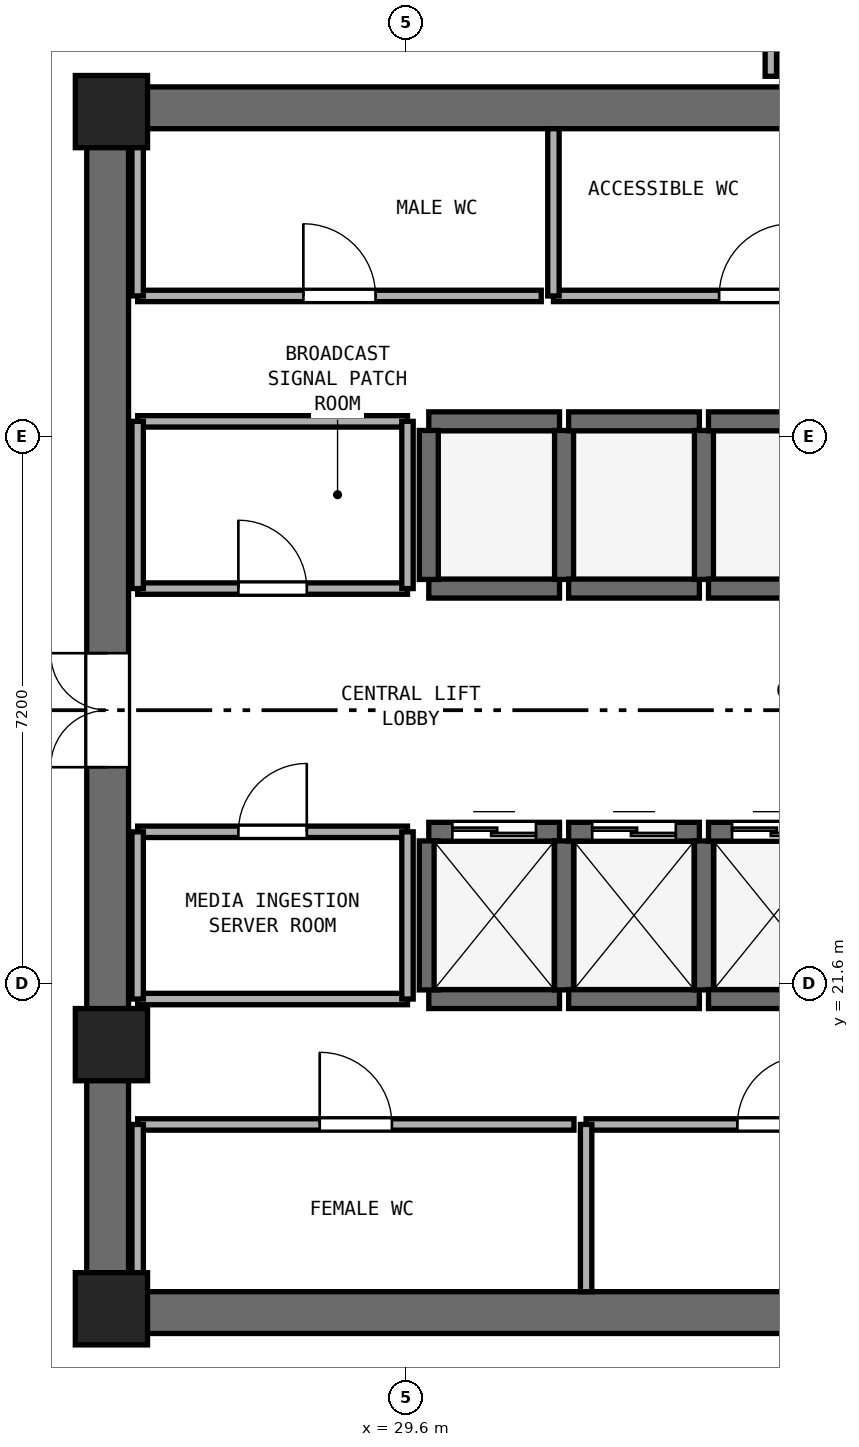
"""IFC4 building model, lengths in metres.
Left out: names, types, materials, properties, quantities, classifications, styles, units other than length and angle.
Written with IfcOpenShell. Run it as: python <this file> out.ifc"""

import sys

from ifc_helpers import new_model, si_unit, direction, frame, frame_2d, origin, origin_2d, place, context, subcontext, project, spatial, rectangle, extrude, element, fill, save


model = new_model("IFC4")
c1 = context("Model", 3, precision=1e-05, world=origin(), true_north=direction((0.0, 1.0)))
c2 = subcontext(c1, "Body", "Model", "MODEL_VIEW")
j1 = project(units=[si_unit("LENGTHUNIT", "METRE"), si_unit("PLANEANGLEUNIT", "RADIAN")], contexts=[c1])
p1 = place(None, origin())
s1 = spatial("IfcSite", under=j1, at=p1, CompositionType="ELEMENT")
p2 = place(p1, origin())
s2 = spatial("IfcBuilding", under=s1, at=p2, CompositionType="ELEMENT")
p3 = place(p2, frame((0.0, 0.0, 136.4)))
s3 = spatial("IfcBuildingStorey", under=s2, at=p3, CompositionType="ELEMENT", Elevation=136.4)
for number, where, z_axis, x_axis in (
    (1, (25.4, 17.275, 0.0), (0.0, 0.0, 1.0), (1.0, 0.0, 0.0)),
    (2, (25.4, 33.125, 0.0), (0.0, 0.0, 1.0), (1.0, 0.0, 0.0)),
):
    element("IfcWall", number, at=place(p3, frame(where, z_axis=z_axis, x_axis=x_axis)), inside=s3, PredefinedType="SHEAR", context=c2, shape_type="SweptSolid", body=[
        extrude(rectangle(XDim=23.2, YDim=0.55, at=frame_2d((11.6, 0.0))), origin(), (0.0, 0.0, 1.0), 3.54),
    ])
p4 = place(p3, frame((25.675, 17.55, 0.0), z_axis=(0.0, 0.0, 1.0), x_axis=(0.0, 1.0, 0.0)))
e3 = element("IfcWall", 3, at=p4, inside=s3, PredefinedType="SHEAR", context=c2, shape_type="SweptSolid", body=[
    extrude(rectangle(XDim=15.3, YDim=0.55, at=frame_2d((7.65, 0.0))), origin(), (0.0, 0.0, 1.0), 3.54),
])
p5 = place(p4, frame((6.9, 0.0, 0.0)))
e4 = element("IfcOpeningElement", 4, at=p5, cuts=e3, PredefinedType="OPENING", context=c2, shape_type="SweptSolid", body=[
    extrude(rectangle(XDim=1.5, YDim=2.15, at=frame_2d((0.75, 1.075))), frame((0.0, 0.285, 0.0), z_axis=(0.0, -1.0, 0.0), x_axis=(1.0, 0.0, 0.0)), (0.0, 0.0, 1.0), 0.57),
])
for number, where, z_axis, x_axis in (
    (5, (25.725, 17.325, 0.0), (0.0, 0.0, 1.0), (1.0, 0.0, 0.0)),
    (6, (25.725, 33.075, 0.0), (0.0, 0.0, 1.0), (1.0, 0.0, 0.0)),
    (7, (25.725, 20.8, 0.0), (0.0, 0.0, 1.0), (1.0, 0.0, 0.0)),
):
    element("IfcColumn", number, at=place(p3, frame(where, z_axis=z_axis, x_axis=x_axis)), inside=s3, PredefinedType="PILASTER", context=c2, shape_type="SweptSolid", body=[
        extrude(rectangle(XDim=0.95, YDim=0.95, at=origin_2d()), origin(), (0.0, 0.0, 1.0), 3.8),
    ])
p6 = place(p3, frame((29.9, 21.4, 0.0), z_axis=(0.0, 0.0, 1.0), x_axis=(1.0, 0.0, 0.0)))
e8 = element("IfcWall", 8, at=p6, inside=s3, PredefinedType="SHEAR", context=c2, shape_type="SweptSolid", body=[
    extrude(rectangle(XDim=1.72, YDim=0.25, at=frame_2d((0.86, 0.0))), origin(), (0.0, 0.0, 1.0), 3.54),
])
p7 = place(p3, frame((29.9, 23.6, 0.0), z_axis=(0.0, 0.0, 1.0), x_axis=(1.0, 0.0, 0.0)))
e9 = element("IfcWall", 9, at=p7, inside=s3, PredefinedType="SHEAR", context=c2, shape_type="SweptSolid", body=[
    extrude(rectangle(XDim=1.72, YDim=0.25, at=frame_2d((0.86, 0.0))), origin(), (0.0, 0.0, 1.0), 3.54),
])
p8 = place(p7, frame((0.31, 0.0, 0.0)))
e10 = element("IfcOpeningElement", 10, at=p8, cuts=e9, PredefinedType="OPENING", context=c2, shape_type="SweptSolid", body=[
    extrude(rectangle(XDim=1.1, YDim=2.15, at=frame_2d((0.55, 1.075))), frame((0.0, 0.135, 0.0), z_axis=(0.0, -1.0, 0.0), x_axis=(1.0, 0.0, 0.0)), (0.0, 0.0, 1.0), 0.27),
])
for number, where, z_axis, x_axis in (
    (11, (29.9, 21.52, 0.0), (0.0, 0.0, 1.0), (0.0, 1.0, 0.0)),
    (12, (31.68, 21.52, 0.0), (0.0, 0.0, 1.0), (0.0, 1.0, 0.0)),
):
    element("IfcWall", number, at=place(p3, frame(where, z_axis=z_axis, x_axis=x_axis)), inside=s3, PredefinedType="SHEAR", context=c2, shape_type="SweptSolid", body=[
        extrude(rectangle(XDim=1.96, YDim=0.25, at=frame_2d((0.98, 0.0))), origin(), (0.0, 0.0, 1.0), 3.54),
    ])
p9 = place(p3, frame((31.74, 21.4, 0.0), z_axis=(0.0, 0.0, 1.0), x_axis=(1.0, 0.0, 0.0)))
e13 = element("IfcWall", 13, at=p9, inside=s3, PredefinedType="SHEAR", context=c2, shape_type="SweptSolid", body=[
    extrude(rectangle(XDim=1.72, YDim=0.25, at=frame_2d((0.86, 0.0))), origin(), (0.0, 0.0, 1.0), 3.54),
])
p10 = place(p3, frame((31.74, 23.6, 0.0), z_axis=(0.0, 0.0, 1.0), x_axis=(1.0, 0.0, 0.0)))
e14 = element("IfcWall", 14, at=p10, inside=s3, PredefinedType="SHEAR", context=c2, shape_type="SweptSolid", body=[
    extrude(rectangle(XDim=1.72, YDim=0.25, at=frame_2d((0.86, 0.0))), origin(), (0.0, 0.0, 1.0), 3.54),
])
p11 = place(p10, frame((0.31, 0.0, 0.0)))
e15 = element("IfcOpeningElement", 15, at=p11, cuts=e14, PredefinedType="OPENING", context=c2, shape_type="SweptSolid", body=[
    extrude(rectangle(XDim=1.1, YDim=2.15, at=frame_2d((0.55, 1.075))), frame((0.0, 0.135, 0.0), z_axis=(0.0, -1.0, 0.0), x_axis=(1.0, 0.0, 0.0)), (0.0, 0.0, 1.0), 0.27),
])
p12 = place(p3, frame((33.52, 21.52, 0.0), z_axis=(0.0, 0.0, 1.0), x_axis=(0.0, 1.0, 0.0)))
e16 = element("IfcWall", 16, at=p12, inside=s3, PredefinedType="SHEAR", context=c2, shape_type="SweptSolid", body=[
    extrude(rectangle(XDim=1.96, YDim=0.25, at=frame_2d((0.98, 0.0))), origin(), (0.0, 0.0, 1.0), 3.54),
])
p13 = place(p3, frame((33.58, 21.4, 0.0), z_axis=(0.0, 0.0, 1.0), x_axis=(1.0, 0.0, 0.0)))
e17 = element("IfcWall", 17, at=p13, inside=s3, PredefinedType="SHEAR", context=c2, shape_type="SweptSolid", body=[
    extrude(rectangle(XDim=1.72, YDim=0.25, at=frame_2d((0.86, 0.0))), origin(), (0.0, 0.0, 1.0), 3.54),
])
p14 = place(p3, frame((33.58, 23.6, 0.0), z_axis=(0.0, 0.0, 1.0), x_axis=(1.0, 0.0, 0.0)))
e18 = element("IfcWall", 18, at=p14, inside=s3, PredefinedType="SHEAR", context=c2, shape_type="SweptSolid", body=[
    extrude(rectangle(XDim=1.72, YDim=0.25, at=frame_2d((0.86, 0.0))), origin(), (0.0, 0.0, 1.0), 3.54),
])
p15 = place(p14, frame((0.31, 0.0, 0.0)))
e19 = element("IfcOpeningElement", 19, at=p15, cuts=e18, PredefinedType="OPENING", context=c2, shape_type="SweptSolid", body=[
    extrude(rectangle(XDim=1.1, YDim=2.15, at=frame_2d((0.55, 1.075))), frame((0.0, 0.135, 0.0), z_axis=(0.0, -1.0, 0.0), x_axis=(1.0, 0.0, 0.0)), (0.0, 0.0, 1.0), 0.27),
])
for number, where, z_axis, x_axis in (
    (20, (29.9, 26.8, 0.0), (0.0, 0.0, 1.0), (1.0, 0.0, 0.0)),
    (21, (29.9, 29.0, 0.0), (0.0, 0.0, 1.0), (1.0, 0.0, 0.0)),
):
    element("IfcWall", number, at=place(p3, frame(where, z_axis=z_axis, x_axis=x_axis)), inside=s3, PredefinedType="SHEAR", context=c2, shape_type="SweptSolid", body=[
        extrude(rectangle(XDim=1.72, YDim=0.25, at=frame_2d((0.86, 0.0))), origin(), (0.0, 0.0, 1.0), 3.54),
    ])
for number, where, z_axis, x_axis in (
    (22, (29.9, 26.92, 0.0), (0.0, 0.0, 1.0), (0.0, 1.0, 0.0)),
    (23, (31.68, 26.92, 0.0), (0.0, 0.0, 1.0), (0.0, 1.0, 0.0)),
):
    element("IfcWall", number, at=place(p3, frame(where, z_axis=z_axis, x_axis=x_axis)), inside=s3, PredefinedType="SHEAR", context=c2, shape_type="SweptSolid", body=[
        extrude(rectangle(XDim=1.96, YDim=0.25, at=frame_2d((0.98, 0.0))), origin(), (0.0, 0.0, 1.0), 3.54),
    ])
for number, where, z_axis, x_axis in (
    (24, (31.74, 26.8, 0.0), (0.0, 0.0, 1.0), (1.0, 0.0, 0.0)),
    (25, (31.74, 29.0, 0.0), (0.0, 0.0, 1.0), (1.0, 0.0, 0.0)),
):
    element("IfcWall", number, at=place(p3, frame(where, z_axis=z_axis, x_axis=x_axis)), inside=s3, PredefinedType="SHEAR", context=c2, shape_type="SweptSolid", body=[
        extrude(rectangle(XDim=1.72, YDim=0.25, at=frame_2d((0.86, 0.0))), origin(), (0.0, 0.0, 1.0), 3.54),
    ])
p16 = place(p3, frame((33.52, 26.92, 0.0), z_axis=(0.0, 0.0, 1.0), x_axis=(0.0, 1.0, 0.0)))
e26 = element("IfcWall", 26, at=p16, inside=s3, PredefinedType="SHEAR", context=c2, shape_type="SweptSolid", body=[
    extrude(rectangle(XDim=1.96, YDim=0.25, at=frame_2d((0.98, 0.0))), origin(), (0.0, 0.0, 1.0), 3.54),
])
for number, where, z_axis, x_axis in (
    (27, (33.58, 26.8, 0.0), (0.0, 0.0, 1.0), (1.0, 0.0, 0.0)),
    (28, (33.58, 29.0, 0.0), (0.0, 0.0, 1.0), (1.0, 0.0, 0.0)),
):
    element("IfcWall", number, at=place(p3, frame(where, z_axis=z_axis, x_axis=x_axis)), inside=s3, PredefinedType="SHEAR", context=c2, shape_type="SweptSolid", body=[
        extrude(rectangle(XDim=1.72, YDim=0.25, at=frame_2d((0.86, 0.0))), origin(), (0.0, 0.0, 1.0), 3.54),
    ])
p17 = place(p3, frame((26.07, 30.65, 0.0), z_axis=(0.0, 0.0, 1.0), x_axis=(1.0, 0.0, 0.0)))
e29 = element("IfcWall", 29, at=p17, inside=s3, PredefinedType="PARTITIONING", context=c2, shape_type="SweptSolid", body=[
    extrude(rectangle(XDim=5.31, YDim=0.15, at=frame_2d((2.655, 0.0))), origin(), (0.0, 0.0, 1.0), 3.54),
])
p18 = place(p17, frame((2.18, 0.0, 0.0)))
e30 = element("IfcOpeningElement", 30, at=p18, cuts=e29, PredefinedType="OPENING", context=c2, shape_type="SweptSolid", body=[
    extrude(rectangle(XDim=0.95, YDim=2.1, at=frame_2d((0.475, 1.05))), frame((0.0, 0.085, 0.0), z_axis=(0.0, -1.0, 0.0), x_axis=(1.0, 0.0, 0.0)), (0.0, 0.0, 1.0), 0.17),
])
p19 = place(p3, frame((26.07, 30.65, 0.0), z_axis=(0.0, 0.0, 1.0), x_axis=(0.0, 1.0, 0.0)))
e31 = element("IfcWall", 31, at=p19, inside=s3, PredefinedType="PARTITIONING", context=c2, shape_type="SweptSolid", body=[
    extrude(rectangle(XDim=2.2, YDim=0.15, at=frame_2d((1.1, 0.0))), origin(), (0.0, 0.0, 1.0), 2.64),
])
p20 = place(p3, frame((31.54, 30.65, 0.0), z_axis=(0.0, 0.0, 1.0), x_axis=(1.0, 0.0, 0.0)))
e32 = element("IfcWall", 32, at=p20, inside=s3, PredefinedType="PARTITIONING", context=c2, shape_type="SweptSolid", body=[
    extrude(rectangle(XDim=5.31, YDim=0.15, at=frame_2d((2.655, 0.0))), origin(), (0.0, 0.0, 1.0), 3.54),
])
p21 = place(p20, frame((2.18, 0.0, 0.0)))
e33 = element("IfcOpeningElement", 33, at=p21, cuts=e32, PredefinedType="OPENING", context=c2, shape_type="SweptSolid", body=[
    extrude(rectangle(XDim=0.95, YDim=2.1, at=frame_2d((0.475, 1.05))), frame((0.0, 0.085, 0.0), z_axis=(0.0, -1.0, 0.0), x_axis=(1.0, 0.0, 0.0)), (0.0, 0.0, 1.0), 0.17),
])
p22 = place(p3, frame((31.54, 30.65, 0.0), z_axis=(0.0, 0.0, 1.0), x_axis=(0.0, 1.0, 0.0)))
e34 = element("IfcWall", 34, at=p22, inside=s3, PredefinedType="PARTITIONING", context=c2, shape_type="SweptSolid", body=[
    extrude(rectangle(XDim=2.2, YDim=0.15, at=frame_2d((1.1, 0.0))), origin(), (0.0, 0.0, 1.0), 3.54),
])
p23 = place(p3, frame((26.07, 19.75, 0.0), z_axis=(0.0, 0.0, 1.0), x_axis=(1.0, 0.0, 0.0)))
e35 = element("IfcWall", 35, at=p23, inside=s3, PredefinedType="PARTITIONING", context=c2, shape_type="SweptSolid", body=[
    extrude(rectangle(XDim=5.74, YDim=0.15, at=frame_2d((2.87, 0.0))), origin(), (0.0, 0.0, 1.0), 3.54),
])
p24 = place(p23, frame((2.395, 0.0, 0.0)))
e36 = element("IfcOpeningElement", 36, at=p24, cuts=e35, PredefinedType="OPENING", context=c2, shape_type="SweptSolid", body=[
    extrude(rectangle(XDim=0.95, YDim=2.1, at=frame_2d((0.475, 1.05))), frame((0.0, 0.085, 0.0), z_axis=(0.0, -1.0, 0.0), x_axis=(1.0, 0.0, 0.0)), (0.0, 0.0, 1.0), 0.17),
])
p25 = place(p3, frame((26.07, 17.55, 0.0), z_axis=(0.0, 0.0, 1.0), x_axis=(0.0, 1.0, 0.0)))
e37 = element("IfcWall", 37, at=p25, inside=s3, PredefinedType="PARTITIONING", context=c2, shape_type="SweptSolid", body=[
    extrude(rectangle(XDim=2.2, YDim=0.15, at=frame_2d((1.1, 0.0))), origin(), (0.0, 0.0, 1.0), 2.64),
])
p26 = place(p3, frame((31.97, 19.75, 0.0), z_axis=(0.0, 0.0, 1.0), x_axis=(1.0, 0.0, 0.0)))
e38 = element("IfcWall", 38, at=p26, inside=s3, PredefinedType="PARTITIONING", context=c2, shape_type="SweptSolid", body=[
    extrude(rectangle(XDim=4.88, YDim=0.15, at=frame_2d((2.44, 0.0))), origin(), (0.0, 0.0, 1.0), 3.54),
])
p27 = place(p26, frame((1.99, 0.0, 0.0)))
e39 = element("IfcOpeningElement", 39, at=p27, cuts=e38, PredefinedType="OPENING", context=c2, shape_type="SweptSolid", body=[
    extrude(rectangle(XDim=0.9, YDim=2.1, at=frame_2d((0.45, 1.05))), frame((0.0, 0.085, 0.0), z_axis=(0.0, -1.0, 0.0), x_axis=(1.0, 0.0, 0.0)), (0.0, 0.0, 1.0), 0.17),
])
p28 = place(p3, frame((31.97, 17.55, 0.0), z_axis=(0.0, 0.0, 1.0), x_axis=(0.0, 1.0, 0.0)))
e40 = element("IfcWall", 40, at=p28, inside=s3, PredefinedType="PARTITIONING", context=c2, shape_type="SweptSolid", body=[
    extrude(rectangle(XDim=2.2, YDim=0.15, at=frame_2d((1.1, 0.0))), origin(), (0.0, 0.0, 1.0), 3.54),
])
p29 = place(p3, frame((26.07, 26.8, 0.0), z_axis=(0.0, 0.0, 1.0), x_axis=(1.0, 0.0, 0.0)))
e41 = element("IfcWall", 41, at=p29, inside=s3, PredefinedType="PARTITIONING", context=c2, shape_type="SweptSolid", body=[
    extrude(rectangle(XDim=3.55, YDim=0.15, at=frame_2d((1.775, 0.0))), origin(), (0.0, 0.0, 1.0), 3.54),
])
p30 = place(p29, frame((1.325, 0.0, 0.0)))
e42 = element("IfcOpeningElement", 42, at=p30, cuts=e41, PredefinedType="OPENING", context=c2, shape_type="SweptSolid", body=[
    extrude(rectangle(XDim=0.9, YDim=2.1, at=frame_2d((0.45, 1.05))), frame((0.0, 0.085, 0.0), z_axis=(0.0, -1.0, 0.0), x_axis=(1.0, 0.0, 0.0)), (0.0, 0.0, 1.0), 0.17),
])
p31 = place(p3, frame((26.07, 29.0, 0.0), z_axis=(0.0, 0.0, 1.0), x_axis=(1.0, 0.0, 0.0)))
e43 = element("IfcWall", 43, at=p31, inside=s3, PredefinedType="PARTITIONING", context=c2, shape_type="SweptSolid", body=[
    extrude(rectangle(XDim=3.55, YDim=0.15, at=frame_2d((1.775, 0.0))), origin(), (0.0, 0.0, 1.0), 3.54),
])
p32 = place(p3, frame((26.07, 26.8, 0.0), z_axis=(0.0, 0.0, 1.0), x_axis=(0.0, 1.0, 0.0)))
e44 = element("IfcWall", 44, at=p32, inside=s3, PredefinedType="PARTITIONING", context=c2, shape_type="SweptSolid", body=[
    extrude(rectangle(XDim=2.2, YDim=0.15, at=frame_2d((1.1, 0.0))), origin(), (0.0, 0.0, 1.0), 2.64),
])
p33 = place(p3, frame((29.62, 26.8, 0.0), z_axis=(0.0, 0.0, 1.0), x_axis=(0.0, 1.0, 0.0)))
e45 = element("IfcWall", 45, at=p33, inside=s3, PredefinedType="PARTITIONING", context=c2, shape_type="SweptSolid", body=[
    extrude(rectangle(XDim=2.2, YDim=0.15, at=frame_2d((1.1, 0.0))), origin(), (0.0, 0.0, 1.0), 3.54),
])
p34 = place(p3, frame((26.07, 21.4, 0.0), z_axis=(0.0, 0.0, 1.0), x_axis=(1.0, 0.0, 0.0)))
e46 = element("IfcWall", 46, at=p34, inside=s3, PredefinedType="PARTITIONING", context=c2, shape_type="SweptSolid", body=[
    extrude(rectangle(XDim=3.55, YDim=0.15, at=frame_2d((1.775, 0.0))), origin(), (0.0, 0.0, 1.0), 3.54),
])
p35 = place(p3, frame((26.07, 23.6, 0.0), z_axis=(0.0, 0.0, 1.0), x_axis=(1.0, 0.0, 0.0)))
e47 = element("IfcWall", 47, at=p35, inside=s3, PredefinedType="PARTITIONING", context=c2, shape_type="SweptSolid", body=[
    extrude(rectangle(XDim=3.55, YDim=0.15, at=frame_2d((1.775, 0.0))), origin(), (0.0, 0.0, 1.0), 3.54),
])
p36 = place(p35, frame((1.325, 0.0, 0.0)))
e48 = element("IfcOpeningElement", 48, at=p36, cuts=e47, PredefinedType="OPENING", context=c2, shape_type="SweptSolid", body=[
    extrude(rectangle(XDim=0.9, YDim=2.1, at=frame_2d((0.45, 1.05))), frame((0.0, 0.085, 0.0), z_axis=(0.0, -1.0, 0.0), x_axis=(1.0, 0.0, 0.0)), (0.0, 0.0, 1.0), 0.17),
])
p37 = place(p3, frame((26.07, 21.4, 0.0), z_axis=(0.0, 0.0, 1.0), x_axis=(0.0, 1.0, 0.0)))
e49 = element("IfcWall", 49, at=p37, inside=s3, PredefinedType="PARTITIONING", context=c2, shape_type="SweptSolid", body=[
    extrude(rectangle(XDim=2.2, YDim=0.15, at=frame_2d((1.1, 0.0))), origin(), (0.0, 0.0, 1.0), 2.64),
])
p38 = place(p3, frame((29.62, 21.4, 0.0), z_axis=(0.0, 0.0, 1.0), x_axis=(0.0, 1.0, 0.0)))
e50 = element("IfcWall", 50, at=p38, inside=s3, PredefinedType="PARTITIONING", context=c2, shape_type="SweptSolid", body=[
    extrude(rectangle(XDim=2.2, YDim=0.15, at=frame_2d((1.1, 0.0))), origin(), (0.0, 0.0, 1.0), 3.54),
])
p39 = place(p3, frame((34.4, 33.54, 0.0), z_axis=(0.0, 0.0, 1.0), x_axis=(0.0, 1.0, 0.0)))
e51 = element("IfcWall", 51, at=p39, inside=s3, PredefinedType="PARTITIONING", context=c2, shape_type="SweptSolid", body=[
    extrude(rectangle(XDim=3.71, YDim=0.15, at=frame_2d((1.855, 0.0))), origin(), (0.0, 0.0, 1.0), 3.54),
])
p40 = place(p39, frame((1.355, 0.0, 0.0)))
e52 = element("IfcOpeningElement", 52, at=p40, cuts=e51, PredefinedType="OPENING", context=c2, shape_type="SweptSolid", body=[
    extrude(rectangle(XDim=1.0, YDim=2.12, at=frame_2d((0.5, 1.06))), frame((0.0, 0.085, 0.0), z_axis=(0.0, -1.0, 0.0), x_axis=(1.0, 0.0, 0.0)), (0.0, 0.0, 1.0), 0.17),
])
p41 = place(p8, origin())
e53 = element("IfcDoor", 53, at=p41, inside=s3, OperationType="DOUBLE_DOOR_SLIDING", PredefinedType="DOOR", context=c2, shape_type="SweptSolid", body=[
    extrude(rectangle(XDim=1.1, YDim=2.15, at=frame_2d((0.55, 1.075))), frame((0.0, 0.025, 0.0), z_axis=(0.0, -1.0, 0.0), x_axis=(1.0, 0.0, 0.0)), (0.0, 0.0, 1.0), 0.05),
])
fill(e10, e53)
p42 = place(p11, origin())
e54 = element("IfcDoor", 54, at=p42, inside=s3, OperationType="DOUBLE_DOOR_SLIDING", PredefinedType="DOOR", context=c2, shape_type="SweptSolid", body=[
    extrude(rectangle(XDim=1.1, YDim=2.15, at=frame_2d((0.55, 1.075))), frame((0.0, 0.025, 0.0), z_axis=(0.0, -1.0, 0.0), x_axis=(1.0, 0.0, 0.0)), (0.0, 0.0, 1.0), 0.05),
])
fill(e15, e54)
p43 = place(p15, origin())
e55 = element("IfcDoor", 55, at=p43, inside=s3, OperationType="DOUBLE_DOOR_SLIDING", PredefinedType="DOOR", context=c2, shape_type="SweptSolid", body=[
    extrude(rectangle(XDim=1.1, YDim=2.15, at=frame_2d((0.55, 1.075))), frame((0.0, 0.025, 0.0), z_axis=(0.0, -1.0, 0.0), x_axis=(1.0, 0.0, 0.0)), (0.0, 0.0, 1.0), 0.05),
])
fill(e19, e55)
p44 = place(p5, origin())
e56 = element("IfcDoor", 56, at=p44, inside=s3, OperationType="DOUBLE_DOOR_SINGLE_SWING", PredefinedType="DOOR", context=c2, shape_type="SweptSolid", body=[
    extrude(rectangle(XDim=1.5, YDim=2.15, at=frame_2d((0.75, 1.075))), frame((0.0, 0.025, 0.0), z_axis=(0.0, -1.0, 0.0), x_axis=(1.0, 0.0, 0.0)), (0.0, 0.0, 1.0), 0.05),
])
fill(e4, e56)
p45 = place(p18, origin())
e57 = element("IfcDoor", 57, at=p45, inside=s3, OperationType="SINGLE_SWING_LEFT", PredefinedType="DOOR", context=c2, shape_type="SweptSolid", body=[
    extrude(rectangle(XDim=0.95, YDim=2.1, at=frame_2d((0.475, 1.05))), frame((0.0, 0.025, 0.0), z_axis=(0.0, -1.0, 0.0), x_axis=(1.0, 0.0, 0.0)), (0.0, 0.0, 1.0), 0.05),
])
fill(e30, e57)
p46 = place(p21, origin())
e58 = element("IfcDoor", 58, at=p46, inside=s3, OperationType="SINGLE_SWING_RIGHT", PredefinedType="DOOR", context=c2, shape_type="SweptSolid", body=[
    extrude(rectangle(XDim=0.95, YDim=2.1, at=frame_2d((0.475, 1.05))), frame((0.0, 0.025, 0.0), z_axis=(0.0, -1.0, 0.0), x_axis=(1.0, 0.0, 0.0)), (0.0, 0.0, 1.0), 0.05),
])
fill(e33, e58)
p47 = place(p24, origin())
e59 = element("IfcDoor", 59, at=p47, inside=s3, OperationType="SINGLE_SWING_LEFT", PredefinedType="DOOR", context=c2, shape_type="SweptSolid", body=[
    extrude(rectangle(XDim=0.95, YDim=2.1, at=frame_2d((0.475, 1.05))), frame((0.0, 0.025, 0.0), z_axis=(0.0, -1.0, 0.0), x_axis=(1.0, 0.0, 0.0)), (0.0, 0.0, 1.0), 0.05),
])
fill(e36, e59)
p48 = place(p27, origin())
e60 = element("IfcDoor", 60, at=p48, inside=s3, OperationType="SINGLE_SWING_RIGHT", PredefinedType="DOOR", context=c2, shape_type="SweptSolid", body=[
    extrude(rectangle(XDim=0.9, YDim=2.1, at=frame_2d((0.45, 1.05))), frame((0.0, 0.025, 0.0), z_axis=(0.0, -1.0, 0.0), x_axis=(1.0, 0.0, 0.0)), (0.0, 0.0, 1.0), 0.05),
])
fill(e39, e60)
p49 = place(p30, origin())
e61 = element("IfcDoor", 61, at=p49, inside=s3, OperationType="SINGLE_SWING_LEFT", PredefinedType="DOOR", context=c2, shape_type="SweptSolid", body=[
    extrude(rectangle(XDim=0.9, YDim=2.1, at=frame_2d((0.45, 1.05))), frame((0.0, 0.025, 0.0), z_axis=(0.0, -1.0, 0.0), x_axis=(1.0, 0.0, 0.0)), (0.0, 0.0, 1.0), 0.05),
])
fill(e42, e61)
p50 = place(p36, origin())
e62 = element("IfcDoor", 62, at=p50, inside=s3, OperationType="SINGLE_SWING_RIGHT", PredefinedType="DOOR", context=c2, shape_type="SweptSolid", body=[
    extrude(rectangle(XDim=0.9, YDim=2.1, at=frame_2d((0.45, 1.05))), frame((0.0, 0.025, 0.0), z_axis=(0.0, -1.0, 0.0), x_axis=(1.0, 0.0, 0.0)), (0.0, 0.0, 1.0), 0.05),
])
fill(e48, e62)
save(model, sys.argv[1])
